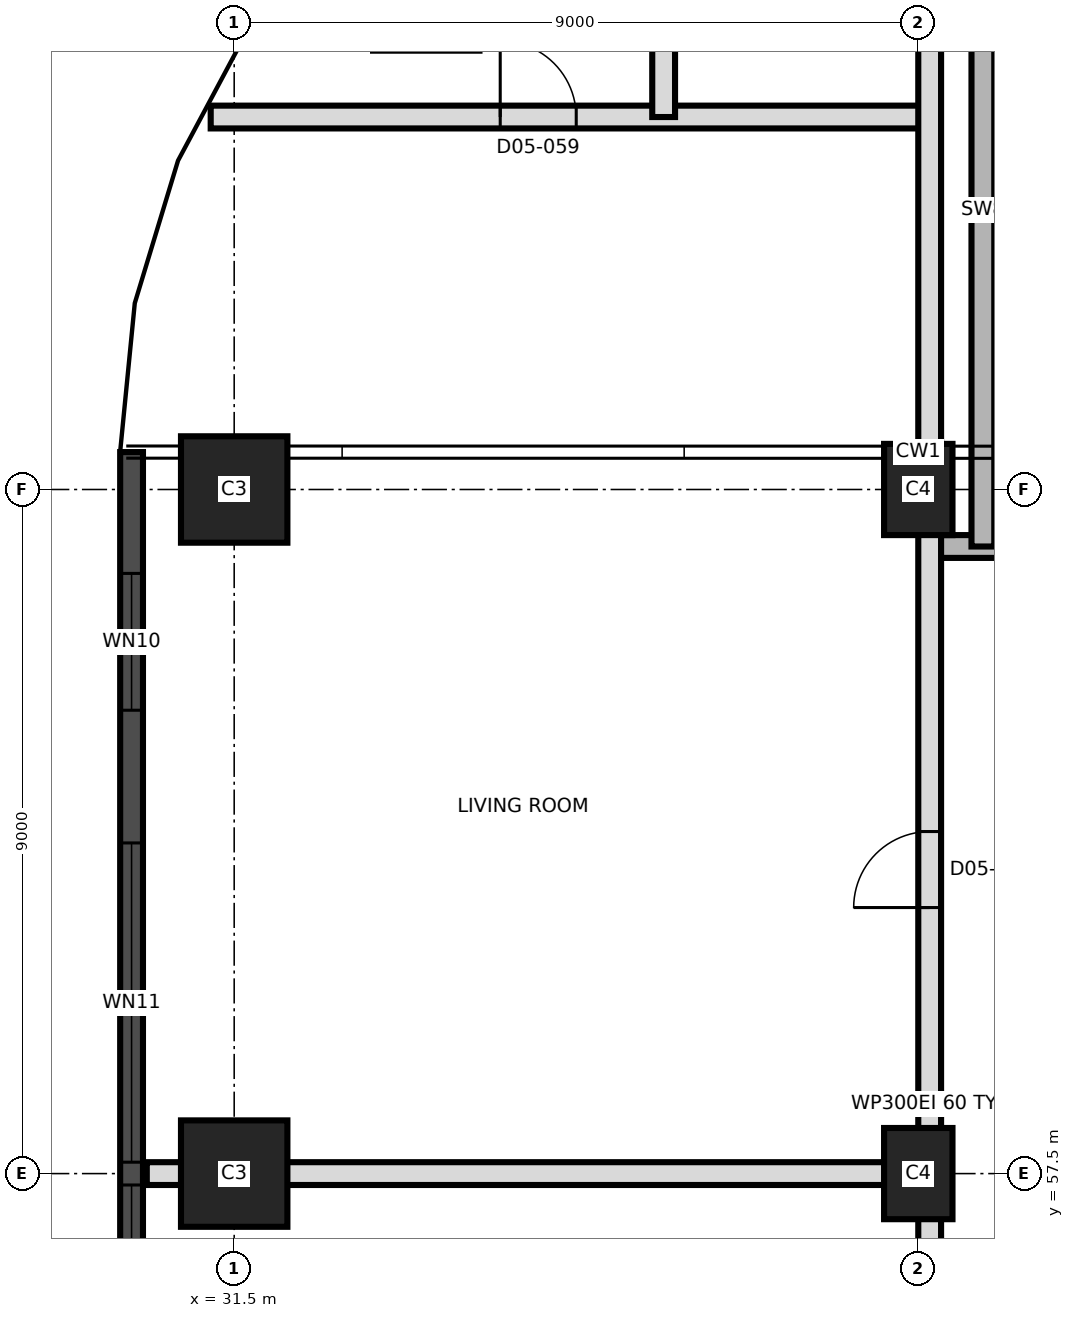
"""IFC4 building model, lengths in metres.
Left out: names, types, materials, properties, quantities, classifications, styles, units other than length and angle.
Written with IfcOpenShell. Run it as: python <this file> out.ifc"""

import sys

from ifc_helpers import new_model, si_unit, direction, frame, frame_2d, origin, origin_2d, place, context, subcontext, project, spatial, rectangle, extrude, element, fill, save


model = new_model("IFC4")
c1 = context("Model", 3, precision=1e-05, world=origin(), true_north=direction((0.0, 1.0)))
c2 = subcontext(c1, "Body", "Model", "MODEL_VIEW")
j1 = project(units=[si_unit("LENGTHUNIT", "METRE"), si_unit("PLANEANGLEUNIT", "RADIAN")], contexts=[c1])
p1 = place(None, origin())
s1 = spatial("IfcSite", under=j1, at=p1, CompositionType="ELEMENT")
p2 = place(p1, origin())
s2 = spatial("IfcBuilding", under=s1, at=p2, CompositionType="ELEMENT")
p3 = place(p2, frame((0.0, 0.0, 70.5)))
s3 = spatial("IfcBuildingStorey", under=s2, at=p3, CompositionType="ELEMENT", Elevation=70.5)
p4 = place(p3, frame((31.5, 57.5, 0.0), z_axis=(0.0, 0.0, 1.0), x_axis=(1.0, 0.0, 0.0)))
e1 = element("IfcColumn", 1, at=p4, inside=s3, PredefinedType="COLUMN", context=c2, shape_type="SweptSolid", body=[
    extrude(rectangle(XDim=1.4, YDim=1.4, at=origin_2d()), origin(), (0.0, 0.0, 1.0), 3.7),
])
p5 = place(p3, frame((40.5, 57.5, 0.0), z_axis=(0.0, 0.0, 1.0), x_axis=(0.0, 1.0, 0.0)))
e2 = element("IfcColumn", 2, at=p5, inside=s3, PredefinedType="COLUMN", context=c2, shape_type="SweptSolid", body=[
    extrude(rectangle(XDim=1.2, YDim=0.9, at=origin_2d()), origin(), (0.0, 0.0, 1.0), 3.7),
])
p6 = place(p3, frame((31.5, 66.5, 0.0), z_axis=(0.0, 0.0, 1.0), x_axis=(1.0, 0.0, 0.0)))
e3 = element("IfcColumn", 3, at=p6, inside=s3, PredefinedType="COLUMN", context=c2, shape_type="SweptSolid", body=[
    extrude(rectangle(XDim=1.4, YDim=1.4, at=origin_2d()), origin(), (0.0, 0.0, 1.0), 3.7),
])
p7 = place(p3, frame((40.5, 66.5, 0.0), z_axis=(0.0, 0.0, 1.0), x_axis=(0.0, 1.0, 0.0)))
e4 = element("IfcColumn", 4, at=p7, inside=s3, PredefinedType="COLUMN", context=c2, shape_type="SweptSolid", body=[
    extrude(rectangle(XDim=1.2, YDim=0.9, at=origin_2d()), origin(), (0.0, 0.0, 1.0), 3.7),
])
p8 = place(p3, frame((30.15, 66.992, 0.0), z_axis=(0.0, 0.0, 1.0), x_axis=(0.0, -1.0, 0.0)))
e5 = element("IfcWall", 5, at=p8, inside=s3, PredefinedType="SOLIDWALL", context=c2, shape_type="SweptSolid", body=[
    extrude(rectangle(XDim=32.968, YDim=0.3, at=frame_2d((16.484, 0.0))), origin(), (0.0, 0.0, 1.0), 3.4),
])
p9 = place(p8, frame((1.596, 0.0, 0.3)))
e6 = element("IfcOpeningElement", 6, at=p9, cuts=e5, PredefinedType="OPENING", context=c2, shape_type="SweptSolid", body=[
    extrude(rectangle(XDim=1.8, YDim=2.4, at=frame_2d((0.9, 1.2))), frame((0.0, 0.16, 0.0), z_axis=(0.0, -1.0, 0.0), x_axis=(1.0, 0.0, 0.0)), (0.0, 0.0, 1.0), 0.32),
])
p10 = place(p8, frame((5.142, 0.0, 0.9)))
e7 = element("IfcOpeningElement", 7, at=p10, cuts=e5, PredefinedType="OPENING", context=c2, shape_type="SweptSolid", body=[
    extrude(rectangle(XDim=4.2, YDim=1.5, at=frame_2d((2.1, 0.75))), frame((0.0, 0.16, 0.0), z_axis=(0.0, -1.0, 0.0), x_axis=(1.0, 0.0, 0.0)), (0.0, 0.0, 1.0), 0.32),
])
p11 = place(p8, frame((9.642, 0.0, 0.9)))
e8 = element("IfcOpeningElement", 8, at=p11, cuts=e5, PredefinedType="OPENING", context=c2, shape_type="SweptSolid", body=[
    extrude(rectangle(XDim=4.2, YDim=1.5, at=frame_2d((2.1, 0.75))), frame((0.0, 0.16, 0.0), z_axis=(0.0, -1.0, 0.0), x_axis=(1.0, 0.0, 0.0)), (0.0, 0.0, 1.0), 0.32),
])
p12 = place(p8, frame((14.142, 0.0, 0.9)))
e9 = element("IfcOpeningElement", 9, at=p12, cuts=e5, PredefinedType="OPENING", context=c2, shape_type="SweptSolid", body=[
    extrude(rectangle(XDim=4.2, YDim=1.5, at=frame_2d((2.1, 0.75))), frame((0.0, 0.16, 0.0), z_axis=(0.0, -1.0, 0.0), x_axis=(1.0, 0.0, 0.0)), (0.0, 0.0, 1.0), 0.32),
])
p13 = place(p8, frame((18.642, 0.0, 0.9)))
e10 = element("IfcOpeningElement", 10, at=p13, cuts=e5, PredefinedType="OPENING", context=c2, shape_type="SweptSolid", body=[
    extrude(rectangle(XDim=4.2, YDim=1.5, at=frame_2d((2.1, 0.75))), frame((0.0, 0.16, 0.0), z_axis=(0.0, -1.0, 0.0), x_axis=(1.0, 0.0, 0.0)), (0.0, 0.0, 1.0), 0.32),
])
p14 = place(p8, frame((23.142, 0.0, 0.9)))
e11 = element("IfcOpeningElement", 11, at=p14, cuts=e5, PredefinedType="OPENING", context=c2, shape_type="SweptSolid", body=[
    extrude(rectangle(XDim=4.2, YDim=1.5, at=frame_2d((2.1, 0.75))), frame((0.0, 0.16, 0.0), z_axis=(0.0, -1.0, 0.0), x_axis=(1.0, 0.0, 0.0)), (0.0, 0.0, 1.0), 0.32),
])
p15 = place(p8, frame((29.33, 0.0, 0.3)))
e12 = element("IfcOpeningElement", 12, at=p15, cuts=e5, PredefinedType="OPENING", context=c2, shape_type="SweptSolid", body=[
    extrude(rectangle(XDim=1.8, YDim=2.4, at=frame_2d((0.9, 1.2))), frame((0.0, 0.16, 0.0), z_axis=(0.0, -1.0, 0.0), x_axis=(1.0, 0.0, 0.0)), (0.0, 0.0, 1.0), 0.32),
])
p16 = place(p3, frame((30.35, 57.5, 0.0), z_axis=(0.0, 0.0, 1.0), x_axis=(1.0, 0.0, 0.0)))
e13 = element("IfcWall", 13, at=p16, inside=s3, PredefinedType="PARTITIONING", context=c2, shape_type="SweptSolid", body=[
    extrude(rectangle(XDim=10.3, YDim=0.3, at=frame_2d((5.15, 0.0))), origin(), (0.0, 0.0, 1.0), 3.4),
])
p17 = place(p3, frame((40.65, 65.75, 0.0), z_axis=(0.0, 0.0, 1.0), x_axis=(1.0, 0.0, 0.0)))
e14 = element("IfcWall", 14, at=p17, inside=s3, PredefinedType="SHEAR", context=c2, shape_type="SweptSolid", body=[
    extrude(rectangle(XDim=3.7, YDim=0.3, at=frame_2d((1.85, 0.0))), origin(), (0.0, 0.0, 1.0), 3.4),
])
p18 = place(p17, frame((1.1, 0.0, 0.0)))
e15 = element("IfcOpeningElement", 15, at=p18, cuts=e14, PredefinedType="OPENING", context=c2, shape_type="SweptSolid", body=[
    extrude(rectangle(XDim=1.2, YDim=2.1, at=frame_2d((0.6, 1.05))), frame((0.0, 0.16, 0.0), z_axis=(0.0, -1.0, 0.0), x_axis=(1.0, 0.0, 0.0)), (0.0, 0.0, 1.0), 0.32),
])
p19 = place(p3, frame((31.191, 71.4, 0.0), z_axis=(0.0, 0.0, 1.0), x_axis=(1.0, 0.0, 0.0)))
e16 = element("IfcWall", 16, at=p19, inside=s3, PredefinedType="PARTITIONING", context=c2, shape_type="SweptSolid", body=[
    extrude(rectangle(XDim=9.459, YDim=0.3, at=frame_2d((4.729, 0.0))), origin(), (0.0, 0.0, 1.0), 3.4),
])
p20 = place(p19, frame((3.809, 0.0, 0.0)))
e17 = element("IfcOpeningElement", 17, at=p20, cuts=e16, PredefinedType="OPENING", context=c2, shape_type="SweptSolid", body=[
    extrude(rectangle(XDim=1.0, YDim=2.1, at=frame_2d((0.5, 1.05))), frame((0.0, 0.16, 0.0), z_axis=(0.0, -1.0, 0.0), x_axis=(1.0, 0.0, 0.0)), (0.0, 0.0, 1.0), 0.32),
])
p21 = place(p3, frame((37.15, 71.4, 0.0), z_axis=(0.0, 0.0, 1.0), x_axis=(0.0, 1.0, 0.0)))
e18 = element("IfcWall", 18, at=p21, inside=s3, PredefinedType="PARTITIONING", context=c2, shape_type="SweptSolid", body=[
    extrude(rectangle(XDim=3.3, YDim=0.3, at=frame_2d((1.65, 0.0))), origin(), (0.0, 0.0, 1.0), 3.4),
])
p22 = place(p21, frame((1.25, 0.0, 0.0)))
e19 = element("IfcOpeningElement", 19, at=p22, cuts=e18, PredefinedType="OPENING", context=c2, shape_type="SweptSolid", body=[
    extrude(rectangle(XDim=0.8, YDim=2.1, at=frame_2d((0.4, 1.05))), frame((0.0, 0.16, 0.0), z_axis=(0.0, -1.0, 0.0), x_axis=(1.0, 0.0, 0.0)), (0.0, 0.0, 1.0), 0.32),
])
p23 = place(p3, frame((40.65, 39.95, 0.0), z_axis=(0.0, 0.0, 1.0), x_axis=(0.0, 1.0, 0.0)))
e20 = element("IfcWall", 20, at=p23, inside=s3, PredefinedType="PARTITIONING", context=c2, shape_type="SweptSolid", body=[
    extrude(rectangle(XDim=36.94, YDim=0.3, at=frame_2d((18.47, 0.0))), origin(), (0.0, 0.0, 1.0), 3.4),
])
p24 = place(p23, frame((0.7, 0.0, 0.0)))
e21 = element("IfcOpeningElement", 21, at=p24, cuts=e20, PredefinedType="OPENING", context=c2, shape_type="SweptSolid", body=[
    extrude(rectangle(XDim=1.0, YDim=2.1, at=frame_2d((0.5, 1.05))), frame((0.0, 0.16, 0.0), z_axis=(0.0, -1.0, 0.0), x_axis=(1.0, 0.0, 0.0)), (0.0, 0.0, 1.0), 0.32),
])
p25 = place(p23, frame((6.55, 0.0, 0.0)))
e22 = element("IfcOpeningElement", 22, at=p25, cuts=e20, PredefinedType="OPENING", context=c2, shape_type="SweptSolid", body=[
    extrude(rectangle(XDim=1.0, YDim=2.1, at=frame_2d((0.5, 1.05))), frame((0.0, 0.16, 0.0), z_axis=(0.0, -1.0, 0.0), x_axis=(1.0, 0.0, 0.0)), (0.0, 0.0, 1.0), 0.32),
])
p26 = place(p23, frame((9.22, 0.0, 0.0)))
e23 = element("IfcOpeningElement", 23, at=p26, cuts=e20, PredefinedType="OPENING", context=c2, shape_type="SweptSolid", body=[
    extrude(rectangle(XDim=1.0, YDim=2.1, at=frame_2d((0.5, 1.05))), frame((0.0, 0.16, 0.0), z_axis=(0.0, -1.0, 0.0), x_axis=(1.0, 0.0, 0.0)), (0.0, 0.0, 1.0), 0.32),
])
p27 = place(p23, frame((15.07, 0.0, 0.0)))
e24 = element("IfcOpeningElement", 24, at=p27, cuts=e20, PredefinedType="OPENING", context=c2, shape_type="SweptSolid", body=[
    extrude(rectangle(XDim=1.0, YDim=2.1, at=frame_2d((0.5, 1.05))), frame((0.0, 0.16, 0.0), z_axis=(0.0, -1.0, 0.0), x_axis=(1.0, 0.0, 0.0)), (0.0, 0.0, 1.0), 0.32),
])
p28 = place(p23, frame((21.05, 0.0, 0.0)))
e25 = element("IfcOpeningElement", 25, at=p28, cuts=e20, PredefinedType="OPENING", context=c2, shape_type="SweptSolid", body=[
    extrude(rectangle(XDim=1.0, YDim=2.4, at=frame_2d((0.5, 1.2))), frame((0.0, 0.16, 0.0), z_axis=(0.0, -1.0, 0.0), x_axis=(1.0, 0.0, 0.0)), (0.0, 0.0, 1.0), 0.32),
])
p29 = place(p3, frame((41.35, 65.75, 0.0), z_axis=(0.0, 0.0, 1.0), x_axis=(0.0, 1.0, 0.0)))
e26 = element("IfcWall", 26, at=p29, inside=s3, PredefinedType="SHEAR", context=c2, shape_type="SweptSolid", body=[
    extrude(rectangle(XDim=8.85, YDim=0.3, at=frame_2d((4.425, 0.0))), origin(), (0.0, 0.0, 1.0), 3.4),
])
p30 = place(p9, origin())
e27 = element("IfcWindow", 27, at=p30, inside=s3, PartitioningType="SINGLE_PANEL", PredefinedType="WINDOW", context=c2, shape_type="SweptSolid", body=[
    extrude(rectangle(XDim=1.8, YDim=2.4, at=frame_2d((0.9, 1.2))), frame((0.0, 0.03, 0.0), z_axis=(0.0, -1.0, 0.0), x_axis=(1.0, 0.0, 0.0)), (0.0, 0.0, 1.0), 0.06),
])
fill(e6, e27)
p31 = place(p10, origin())
e28 = element("IfcWindow", 28, at=p31, inside=s3, PartitioningType="SINGLE_PANEL", PredefinedType="WINDOW", context=c2, shape_type="SweptSolid", body=[
    extrude(rectangle(XDim=4.2, YDim=1.5, at=frame_2d((2.1, 0.75))), frame((0.0, 0.03, 0.0), z_axis=(0.0, -1.0, 0.0), x_axis=(1.0, 0.0, 0.0)), (0.0, 0.0, 1.0), 0.06),
])
fill(e7, e28)
p32 = place(p11, origin())
e29 = element("IfcWindow", 29, at=p32, inside=s3, PartitioningType="SINGLE_PANEL", PredefinedType="WINDOW", context=c2, shape_type="SweptSolid", body=[
    extrude(rectangle(XDim=4.2, YDim=1.5, at=frame_2d((2.1, 0.75))), frame((0.0, 0.03, 0.0), z_axis=(0.0, -1.0, 0.0), x_axis=(1.0, 0.0, 0.0)), (0.0, 0.0, 1.0), 0.06),
])
fill(e8, e29)
p33 = place(p28, origin())
e30 = element("IfcDoor", 30, at=p33, inside=s3, OperationType="SINGLE_SWING_RIGHT", PredefinedType="DOOR", context=c2, shape_type="SweptSolid", body=[
    extrude(rectangle(XDim=1.0, YDim=2.4, at=frame_2d((0.5, 1.2))), frame((0.0, 0.025, 0.0), z_axis=(0.0, -1.0, 0.0), x_axis=(1.0, 0.0, 0.0)), (0.0, 0.0, 1.0), 0.05),
])
fill(e25, e30)
p34 = place(p20, origin())
e31 = element("IfcDoor", 31, at=p34, inside=s3, OperationType="SINGLE_SWING_LEFT", PredefinedType="DOOR", context=c2, shape_type="SweptSolid", body=[
    extrude(rectangle(XDim=1.0, YDim=2.1, at=frame_2d((0.5, 1.05))), frame((0.0, 0.025, 0.0), z_axis=(0.0, -1.0, 0.0), x_axis=(1.0, 0.0, 0.0)), (0.0, 0.0, 1.0), 0.05),
])
fill(e17, e31)
save(model, sys.argv[1])
